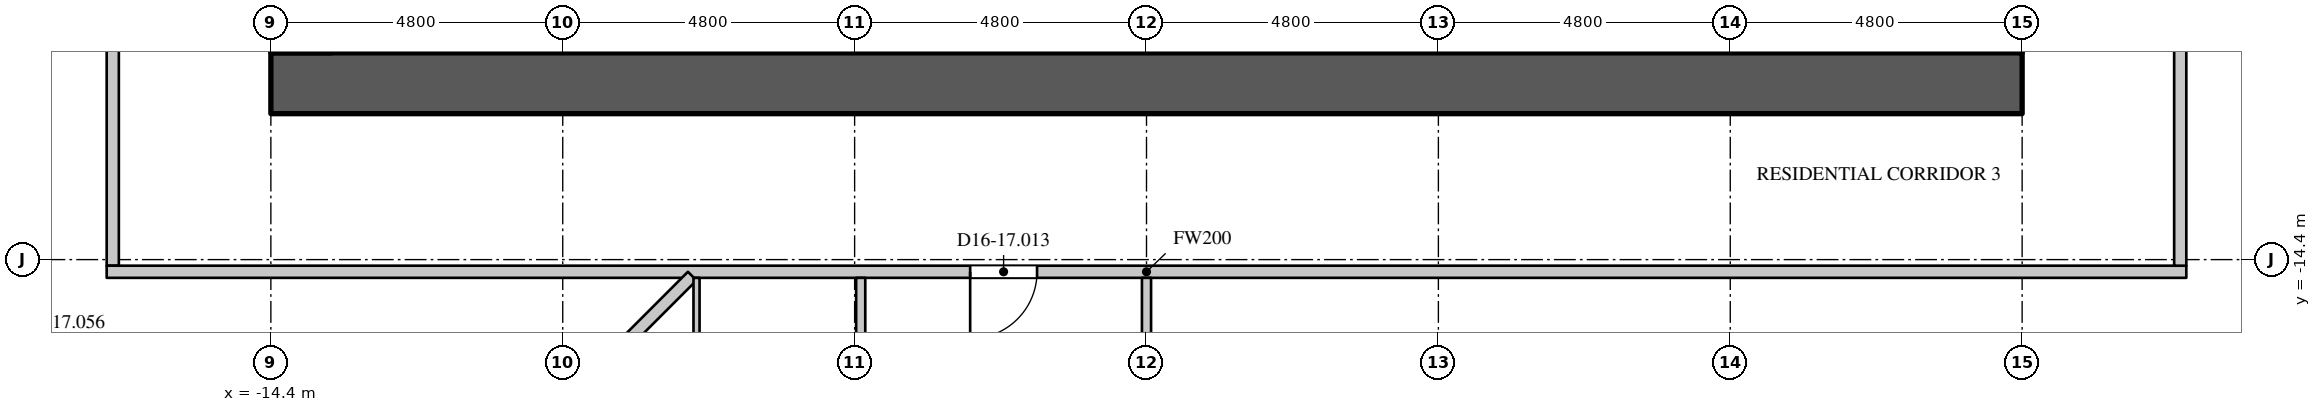
"""IFC4 building model, lengths in metres.
Left out: names, types, materials, properties, quantities, classifications, styles, units other than length and angle.
Written with IfcOpenShell. Run it as: python <this file> out.ifc"""

import sys

from ifc_helpers import new_model, si_unit, direction, frame, frame_2d, origin, place, context, subcontext, project, spatial, rectangle, extrude, element, fill, save


model = new_model("IFC4")
c1 = context("Model", 3, precision=1e-05, world=origin(), true_north=direction((0.0, 1.0)))
c2 = subcontext(c1, "Body", "Model", "MODEL_VIEW")
j1 = project(units=[si_unit("LENGTHUNIT", "METRE"), si_unit("PLANEANGLEUNIT", "RADIAN")], contexts=[c1])
p1 = place(None, origin())
s1 = spatial("IfcSite", under=j1, at=p1, CompositionType="ELEMENT")
p2 = place(p1, origin())
s2 = spatial("IfcBuilding", under=s1, at=p2, CompositionType="ELEMENT")
p3 = place(p2, frame((0.0, 0.0, 71.7)))
s3 = spatial("IfcBuildingStorey", under=s2, at=p3, CompositionType="ELEMENT", Elevation=71.7)
p4 = place(p3, frame((-14.4, -11.5, 0.0), z_axis=(0.0, 0.0, 1.0), x_axis=(1.0, 0.0, 0.0)))
e1 = element("IfcWall", 1, at=p4, inside=s3, PredefinedType="SHEAR", context=c2, shape_type="SweptSolid", body=[
    extrude(rectangle(XDim=28.8, YDim=1.0, at=frame_2d((14.4, 0.0))), origin(), (0.0, 0.0, 1.0), 4.2),
])
p5 = place(p3, frame((-17.0, -14.5, 0.0), z_axis=(0.0, 0.0, 1.0), x_axis=(0.0, 1.0, 0.0)))
e2 = element("IfcWall", 2, at=p5, inside=s3, PredefinedType="PARTITIONING", context=c2, shape_type="SweptSolid", body=[
    extrude(rectangle(XDim=29.0, YDim=0.2, at=frame_2d((14.5, 0.0))), origin(), (0.0, 0.0, 1.0), 3.95),
])
p6 = place(p5, frame((11.9, 0.0, 0.0)))
e3 = element("IfcOpeningElement", 3, at=p6, cuts=e2, PredefinedType="OPENING", context=c2, shape_type="SweptSolid", body=[
    extrude(rectangle(XDim=1.1, YDim=2.4, at=frame_2d((0.55, 1.2))), frame((0.0, 0.11, 0.0), z_axis=(0.0, -1.0, 0.0), x_axis=(1.0, 0.0, 0.0)), (0.0, 0.0, 1.0), 0.22),
])
p7 = place(p3, frame((-17.1, -14.6, 0.0), z_axis=(0.0, 0.0, 1.0), x_axis=(1.0, 0.0, 0.0)))
e4 = element("IfcWall", 4, at=p7, inside=s3, PredefinedType="PARTITIONING", context=c2, shape_type="SweptSolid", body=[
    extrude(rectangle(XDim=34.2, YDim=0.2, at=frame_2d((17.1, 0.0))), origin(), (0.0, 0.0, 1.0), 3.95),
])
p8 = place(p7, frame((14.2, 0.0, 0.0)))
e5 = element("IfcOpeningElement", 5, at=p8, cuts=e4, PredefinedType="OPENING", context=c2, shape_type="SweptSolid", body=[
    extrude(rectangle(XDim=1.1, YDim=2.4, at=frame_2d((0.55, 1.2))), frame((0.0, 0.11, 0.0), z_axis=(0.0, -1.0, 0.0), x_axis=(1.0, 0.0, 0.0)), (0.0, 0.0, 1.0), 0.22),
])
p9 = place(p3, frame((17.0, -14.5, 0.0), z_axis=(0.0, 0.0, 1.0), x_axis=(0.0, 1.0, 0.0)))
e6 = element("IfcWall", 6, at=p9, inside=s3, PredefinedType="PARTITIONING", context=c2, shape_type="SweptSolid", body=[
    extrude(rectangle(XDim=29.0, YDim=0.2, at=frame_2d((14.5, 0.0))), origin(), (0.0, 0.0, 1.0), 3.95),
])
p10 = place(p9, frame((16.1, 0.0, 0.0)))
e7 = element("IfcOpeningElement", 7, at=p10, cuts=e6, PredefinedType="OPENING", context=c2, shape_type="SweptSolid", body=[
    extrude(rectangle(XDim=1.1, YDim=2.4, at=frame_2d((0.55, 1.2))), frame((0.0, 0.11, 0.0), z_axis=(0.0, -1.0, 0.0), x_axis=(1.0, 0.0, 0.0)), (0.0, 0.0, 1.0), 0.22),
])
p11 = place(p3, frame((-22.747, -11.968, 0.0), z_axis=(0.0, 0.0, 1.0), x_axis=(0.707106781187, -0.707106781187, 0.0)))
e8 = element("IfcWall", 8, at=p11, inside=s3, PredefinedType="PARTITIONING", context=c2, shape_type="SweptSolid", body=[
    extrude(rectangle(XDim=12.613, YDim=0.15, at=frame_2d((6.307, 0.0))), origin(), (0.0, 0.0, 1.0), 3.95),
])
p12 = place(p11, frame((4.45, 0.0, 0.0)))
e9 = element("IfcOpeningElement", 9, at=p12, cuts=e8, PredefinedType="OPENING", context=c2, shape_type="SweptSolid", body=[
    extrude(rectangle(XDim=0.95, YDim=2.2, at=frame_2d((0.475, 1.1))), frame((0.0, 0.085, 0.0), z_axis=(0.0, -1.0, 0.0), x_axis=(1.0, 0.0, 0.0)), (0.0, 0.0, 1.0), 0.17),
])
p13 = place(p11, frame((9.65, 0.0, 0.0)))
e10 = element("IfcOpeningElement", 10, at=p13, cuts=e8, PredefinedType="OPENING", context=c2, shape_type="SweptSolid", body=[
    extrude(rectangle(XDim=0.95, YDim=2.2, at=frame_2d((0.475, 1.1))), frame((0.0, 0.085, 0.0), z_axis=(0.0, -1.0, 0.0), x_axis=(1.0, 0.0, 0.0)), (0.0, 0.0, 1.0), 0.17),
])
p14 = place(p3, frame((-4.7, -21.725, 0.0), z_axis=(0.0, 0.0, 1.0), x_axis=(0.0, 1.0, 0.0)))
e11 = element("IfcWall", 11, at=p14, inside=s3, PredefinedType="PARTITIONING", context=c2, shape_type="SweptSolid", body=[
    extrude(rectangle(XDim=7.025, YDim=0.15, at=frame_2d((3.513, 0.0))), origin(), (0.0, 0.0, 1.0), 3.2),
])
p15 = place(p14, frame((3.05, 0.0, 0.0)))
e12 = element("IfcOpeningElement", 12, at=p15, cuts=e11, PredefinedType="OPENING", context=c2, shape_type="SweptSolid", body=[
    extrude(rectangle(XDim=0.95, YDim=2.2, at=frame_2d((0.475, 1.1))), frame((0.0, 0.085, 0.0), z_axis=(0.0, -1.0, 0.0), x_axis=(1.0, 0.0, 0.0)), (0.0, 0.0, 1.0), 0.17),
])
p16 = place(p3, frame((0.0, -20.02, 0.0), z_axis=(0.0, 0.0, 1.0), x_axis=(0.0, 1.0, 0.0)))
e13 = element("IfcWall", 13, at=p16, inside=s3, PredefinedType="PARTITIONING", context=c2, shape_type="SweptSolid", body=[
    extrude(rectangle(XDim=5.32, YDim=0.15, at=frame_2d((2.66, 0.0))), origin(), (0.0, 0.0, 1.0), 3.95),
])
p17 = place(p16, frame((2.25, 0.0, 0.0)))
e14 = element("IfcOpeningElement", 14, at=p17, cuts=e13, PredefinedType="OPENING", context=c2, shape_type="SweptSolid", body=[
    extrude(rectangle(XDim=0.95, YDim=2.2, at=frame_2d((0.475, 1.1))), frame((0.0, 0.085, 0.0), z_axis=(0.0, -1.0, 0.0), x_axis=(1.0, 0.0, 0.0)), (0.0, 0.0, 1.0), 0.17),
])
p18 = place(p3, frame((17.693, -17.587, 0.0), z_axis=(0.0, 0.0, 1.0), x_axis=(0.707106781187, 0.707106781187, 0.0)))
e15 = element("IfcWall", 15, at=p18, inside=s3, PredefinedType="PARTITIONING", context=c2, shape_type="SweptSolid", body=[
    extrude(rectangle(XDim=4.916, YDim=0.15, at=frame_2d((2.458, 0.0))), origin(), (0.0, 0.0, 1.0), 3.95),
])
p19 = place(p18, frame((1.95, 0.0, 0.0)))
e16 = element("IfcOpeningElement", 16, at=p19, cuts=e15, PredefinedType="OPENING", context=c2, shape_type="SweptSolid", body=[
    extrude(rectangle(XDim=0.95, YDim=2.2, at=frame_2d((0.475, 1.1))), frame((0.0, 0.085, 0.0), z_axis=(0.0, -1.0, 0.0), x_axis=(1.0, 0.0, 0.0)), (0.0, 0.0, 1.0), 0.17),
])
p20 = place(p3, frame((-18.039, -25.239, 0.0), z_axis=(0.0, 0.0, 1.0), x_axis=(0.707106781187, 0.707106781187, 0.0)))
e17 = element("IfcWall", 17, at=p20, inside=s3, PredefinedType="PARTITIONING", context=c2, shape_type="SweptSolid", body=[
    extrude(rectangle(XDim=14.946, YDim=0.2, at=frame_2d((7.473, 0.0))), origin(), (0.0, 0.0, 1.0), 3.95),
])
p21 = place(p3, frame((17.071, -9.871, 0.0), z_axis=(0.0, 0.0, 1.0), x_axis=(0.707096213553, -0.707117348662, 0.0)))
e18 = element("IfcWall", 18, at=p21, inside=s3, PredefinedType="PARTITIONING", context=c2, shape_type="SweptSolid", body=[
    extrude(rectangle(XDim=11.552, YDim=0.2, at=frame_2d((5.776, 0.0))), origin(), (0.0, 0.0, 1.0), 3.95),
])
p22 = place(p3, frame((-7.4, -21.725, 0.0), z_axis=(0.0, 0.0, 1.0), x_axis=(0.0, 1.0, 0.0)))
e19 = element("IfcWall", 19, at=p22, inside=s3, PredefinedType="PARTITIONING", context=c2, shape_type="SweptSolid", body=[
    extrude(rectangle(XDim=7.025, YDim=0.1, at=frame_2d((3.513, 0.0))), origin(), (0.0, 0.0, 1.0), 3.95),
])
p23 = place(p8, origin())
e20 = element("IfcDoor", 20, at=p23, inside=s3, OperationType="SINGLE_SWING_RIGHT", PredefinedType="DOOR", context=c2, shape_type="SweptSolid", body=[
    extrude(rectangle(XDim=1.1, YDim=2.4, at=frame_2d((0.55, 1.2))), frame((0.0, 0.025, 0.0), z_axis=(0.0, -1.0, 0.0), x_axis=(1.0, 0.0, 0.0)), (0.0, 0.0, 1.0), 0.05),
])
fill(e5, e20)
save(model, sys.argv[1])
